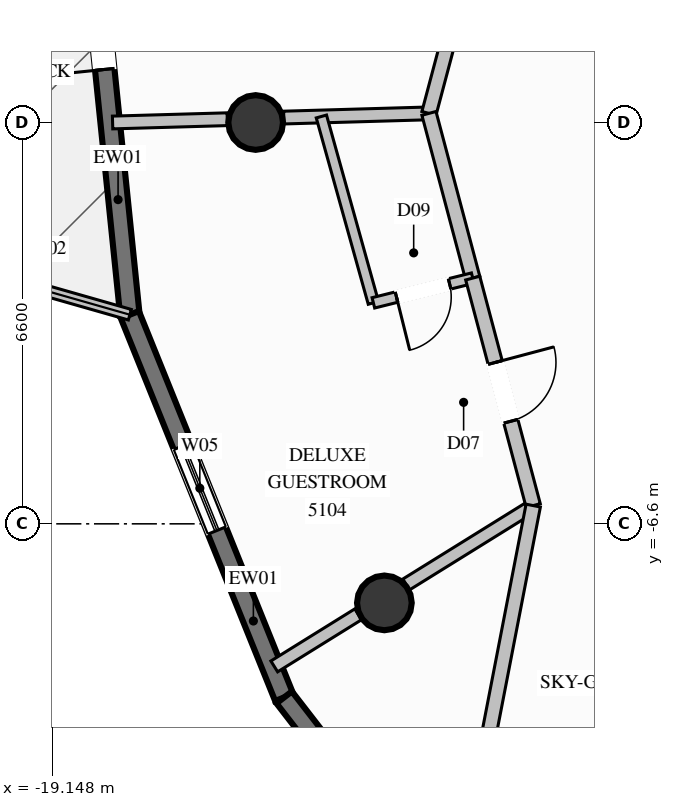
"""IFC4 building model, lengths in metres.
Left out: names, types, materials, properties, quantities, classifications, styles, units other than length and angle.
Written with IfcOpenShell. Run it as: python <this file> out.ifc"""

import sys

from ifc_helpers import new_model, si_unit, direction, frame, frame_2d, origin, origin_2d, place, context, subcontext, project, spatial, rectangle, circle, extrude, element, fill, save


model = new_model("IFC4")
c1 = context("Model", 3, precision=1e-05, world=origin(), true_north=direction((0.0, 1.0)))
c2 = subcontext(c1, "Body", "Model", "MODEL_VIEW")
j1 = project(units=[si_unit("LENGTHUNIT", "METRE"), si_unit("PLANEANGLEUNIT", "RADIAN")], contexts=[c1])
p1 = place(None, origin())
s1 = spatial("IfcSite", under=j1, at=p1, CompositionType="ELEMENT")
p2 = place(p1, origin())
s2 = spatial("IfcBuilding", under=s1, at=p2, CompositionType="ELEMENT")
p3 = place(p2, frame((0.0, 0.0, 191.2)))
s3 = spatial("IfcBuildingStorey", under=s2, at=p3, CompositionType="ELEMENT", Elevation=191.2)
for number, where, z_axis, x_axis in (
    (1, (-15.8, 0.0, 0.0), (0.0, 0.0, 1.0), (1.0, 0.0, 0.0)),
    (2, (-13.683, -7.9, 0.0), (0.0, 0.0, 1.0), (1.0, 0.0, 0.0)),
):
    element("IfcColumn", number, at=place(p3, frame(where, z_axis=z_axis, x_axis=x_axis)), inside=s3, PredefinedType="COLUMN", context=c2, shape_type="SweptSolid", body=[
        extrude(circle(Radius=0.45, at=origin_2d()), origin(), (0.0, 0.0, 1.0), 3.6),
    ])
p4 = place(p3, frame((-17.869, -3.161, 0.0), z_axis=(0.0, 0.0, 1.0), x_axis=(-0.101867372905, 0.994797988708, 0.0)))
e3 = element("IfcWall", 3, at=p4, inside=s3, PredefinedType="SOLIDWALL", context=c2, shape_type="SweptSolid", body=[
    extrude(rectangle(XDim=6.636, YDim=0.32, at=frame_2d((3.318, 0.0))), origin(), (0.0, 0.0, 1.0), 3.36),
])
p5 = place(p4, frame((4.055, 0.0, 0.0)))
e4 = element("IfcOpeningElement", 4, at=p5, cuts=e3, PredefinedType="OPENING", context=c2, shape_type="SweptSolid", body=[
    extrude(rectangle(XDim=1.6, YDim=2.3, at=frame_2d((0.8, 1.15))), frame((0.0, 0.17, 0.0), z_axis=(0.0, -1.0, 0.0), x_axis=(1.0, 0.0, 0.0)), (0.0, 0.0, 1.0), 0.34),
])
p6 = place(p3, frame((-15.331, -9.454, 0.0), z_axis=(0.0, 0.0, 1.0), x_axis=(-0.374000779889, 0.927428388956, 0.0)))
e5 = element("IfcWall", 5, at=p6, inside=s3, PredefinedType="SOLIDWALL", context=c2, shape_type="SweptSolid", body=[
    extrude(rectangle(XDim=6.786, YDim=0.32, at=frame_2d((3.393, 0.0))), origin(), (0.0, 0.0, 1.0), 3.36),
])
p7 = place(p6, frame((2.959, 0.0, 0.85)))
e6 = element("IfcOpeningElement", 6, at=p7, cuts=e5, PredefinedType="OPENING", context=c2, shape_type="SweptSolid", body=[
    extrude(rectangle(XDim=1.5, YDim=1.2, at=frame_2d((0.75, 0.6))), frame((0.0, 0.17, 0.0), z_axis=(0.0, -1.0, 0.0), x_axis=(1.0, 0.0, 0.0)), (0.0, 0.0, 1.0), 0.34),
])
p8 = place(p3, frame((-11.18, -14.821, 0.0), z_axis=(0.0, 0.0, 1.0), x_axis=(-0.611810985794, 0.791003993455, 0.0)))
e7 = element("IfcWall", 7, at=p8, inside=s3, PredefinedType="SOLIDWALL", context=c2, shape_type="SweptSolid", body=[
    extrude(rectangle(XDim=6.785, YDim=0.32, at=frame_2d((3.393, 0.0))), origin(), (0.0, 0.0, 1.0), 3.36),
])
p9 = place(p8, frame((2.642, 0.0, 0.85)))
e8 = element("IfcOpeningElement", 8, at=p9, cuts=e7, PredefinedType="OPENING", context=c2, shape_type="SweptSolid", body=[
    extrude(rectangle(XDim=1.5, YDim=1.2, at=frame_2d((0.75, 0.6))), frame((0.0, 0.17, 0.0), z_axis=(0.0, -1.0, 0.0), x_axis=(1.0, 0.0, 0.0)), (0.0, 0.0, 1.0), 0.34),
])
p10 = place(p3, frame((-20.645, -2.369, 0.0), z_axis=(0.0, 0.0, 1.0), x_axis=(0.961632376074, -0.274341344471, 0.0)))
e9 = element("IfcWall", 9, at=p10, inside=s3, PredefinedType="PARAPET", context=c2, shape_type="SweptSolid", body=[
    extrude(rectangle(XDim=2.887, YDim=0.18, at=frame_2d((1.443, 0.0))), origin(), (0.0, 0.0, 1.0), 1.12),
])
p11 = place(p3, frame((-12.95, 0.15, 0.0), z_axis=(0.0, 0.0, 1.0), x_axis=(-0.999584294169, -0.028831213149, 0.0)))
e10 = element("IfcWall", 10, at=p11, inside=s3, PredefinedType="PARTITIONING", context=c2, shape_type="SweptSolid", body=[
    extrude(rectangle(XDim=2.388, YDim=0.21, at=frame_2d((1.194, 0.0))), origin(), (0.0, 0.0, 1.0), 2.42),
])
p12 = place(p3, frame((-16.267, 0.054, 0.0), z_axis=(0.0, 0.0, 1.0), x_axis=(-0.999591030339, -0.028596714266, 0.0)))
e11 = element("IfcWall", 11, at=p12, inside=s3, PredefinedType="PARTITIONING", context=c2, shape_type="SweptSolid", body=[
    extrude(rectangle(XDim=1.887, YDim=0.21, at=frame_2d((0.943, 0.0))), origin(), (0.0, 0.0, 1.0), 2.42),
])
p13 = place(p3, frame((-11.235, -6.3, 0.0), z_axis=(0.0, 0.0, 1.0), x_axis=(-0.8495787928, -0.527461728302, 0.0)))
e12 = element("IfcWall", 12, at=p13, inside=s3, PredefinedType="PARTITIONING", context=c2, shape_type="SweptSolid", body=[
    extrude(rectangle(XDim=2.459, YDim=0.21, at=frame_2d((1.229, 0.0))), origin(), (0.0, 0.0, 1.0), 2.876),
])
p14 = place(p3, frame((-14.114, -8.088, 0.0), z_axis=(0.0, 0.0, 1.0), x_axis=(-0.849447375162, -0.527673342922, 0.0)))
e13 = element("IfcWall", 13, at=p14, inside=s3, PredefinedType="PARTITIONING", context=c2, shape_type="SweptSolid", body=[
    extrude(rectangle(XDim=1.625, YDim=0.21, at=frame_2d((0.812, 0.0))), origin(), (0.0, 0.0, 1.0), 3.36),
])
p15 = place(p3, frame((-11.955, 3.891, 0.0), z_axis=(0.0, 0.0, 1.0), x_axis=(-0.256991373998, -0.96641369697, 0.0)))
e14 = element("IfcWall", 14, at=p15, inside=s3, PredefinedType="PARTITIONING", context=c2, shape_type="SweptSolid", body=[
    extrude(rectangle(XDim=3.871, YDim=0.24, at=frame_2d((1.936, 0.0))), origin(), (0.0, 0.0, 1.0), 3.36),
])
p16 = place(p15, frame((1.436, 0.0, 0.0)))
e15 = element("IfcOpeningElement", 15, at=p16, cuts=e14, PredefinedType="OPENING", context=c2, shape_type="SweptSolid", body=[
    extrude(rectangle(XDim=1.0, YDim=2.2, at=frame_2d((0.5, 1.1))), frame((0.0, 0.13, 0.0), z_axis=(0.0, -1.0, 0.0), x_axis=(1.0, 0.0, 0.0)), (0.0, 0.0, 1.0), 0.26),
])
p17 = place(p3, frame((-12.95, 0.15, 0.0), z_axis=(0.0, 0.0, 1.0), x_axis=(0.25685481711, -0.966450000221, 0.0)))
e16 = element("IfcWall", 16, at=p17, inside=s3, PredefinedType="PARTITIONING", context=c2, shape_type="SweptSolid", body=[
    extrude(rectangle(XDim=2.803, YDim=0.24, at=frame_2d((1.401, 0.0))), origin(), (0.0, 0.0, 1.0), 3.36),
])
p18 = place(p3, frame((-14.719, 0.099, 0.0), z_axis=(0.0, 0.0, 1.0), x_axis=(0.268676474021, -0.963230477252, 0.0)))
e17 = element("IfcWall", 17, at=p18, inside=s3, PredefinedType="PLUMBINGWALL", context=c2, shape_type="SweptSolid", body=[
    extrude(rectangle(XDim=3.182, YDim=0.175, at=frame_2d((1.591, 0.0))), origin(), (0.0, 0.0, 1.0), 3.36),
])
p19 = place(p3, frame((-12.23, -2.559, 0.0), z_axis=(0.0, 0.0, 1.0), x_axis=(-0.9703553321, -0.24168270411, 0.0)))
e18 = element("IfcWall", 18, at=p19, inside=s3, PredefinedType="PLUMBINGWALL", context=c2, shape_type="SweptSolid", body=[
    extrude(rectangle(XDim=1.684, YDim=0.175, at=frame_2d((0.842, 0.0))), origin(), (0.0, 0.0, 1.0), 3.36),
])
p20 = place(p19, frame((0.392, 0.0, 0.0)))
e19 = element("IfcOpeningElement", 19, at=p20, cuts=e18, PredefinedType="OPENING", context=c2, shape_type="SweptSolid", body=[
    extrude(rectangle(XDim=0.9, YDim=2.1, at=frame_2d((0.45, 1.05))), frame((0.0, 0.098, 0.0), z_axis=(0.0, -1.0, 0.0), x_axis=(1.0, 0.0, 0.0)), (0.0, 0.0, 1.0), 0.195),
])
p21 = place(p3, frame((-12.23, -2.559, 0.0), z_axis=(0.0, 0.0, 1.0), x_axis=(0.257007037833, -0.966409531464, 0.0)))
e20 = element("IfcWall", 20, at=p21, inside=s3, PredefinedType="PARTITIONING", context=c2, shape_type="SweptSolid", body=[
    extrude(rectangle(XDim=3.871, YDim=0.24, at=frame_2d((1.936, 0.0))), origin(), (0.0, 0.0, 1.0), 3.36),
])
p22 = place(p21, frame((1.436, 0.0, 0.0)))
e21 = element("IfcOpeningElement", 21, at=p22, cuts=e20, PredefinedType="OPENING", context=c2, shape_type="SweptSolid", body=[
    extrude(rectangle(XDim=1.0, YDim=2.2, at=frame_2d((0.5, 1.1))), frame((0.0, 0.13, 0.0), z_axis=(0.0, -1.0, 0.0), x_axis=(1.0, 0.0, 0.0)), (0.0, 0.0, 1.0), 0.26),
])
p23 = place(p3, frame((-11.235, -6.3, 0.0), z_axis=(0.0, 0.0, 1.0), x_axis=(-0.190095078136, -0.981765685522, 0.0)))
e22 = element("IfcWall", 22, at=p23, inside=s3, PredefinedType="PARTITIONING", context=c2, shape_type="SweptSolid", body=[
    extrude(rectangle(XDim=5.602, YDim=0.24, at=frame_2d((2.801, 0.0))), origin(), (0.0, 0.0, 1.0), 3.36),
])
p24 = place(p5, origin())
e23 = element("IfcDoor", 23, at=p24, inside=s3, OperationType="SINGLE_SWING_LEFT", PredefinedType="DOOR", context=c2, shape_type="SweptSolid", body=[
    extrude(rectangle(XDim=1.6, YDim=2.3, at=frame_2d((0.8, 1.15))), frame((0.0, 0.025, 0.0), z_axis=(0.0, -1.0, 0.0), x_axis=(1.0, 0.0, 0.0)), (0.0, 0.0, 1.0), 0.05),
])
fill(e4, e23)
p25 = place(p7, origin())
e24 = element("IfcWindow", 24, at=p25, inside=s3, PartitioningType="SINGLE_PANEL", PredefinedType="WINDOW", context=c2, shape_type="SweptSolid", body=[
    extrude(rectangle(XDim=1.5, YDim=1.2, at=frame_2d((0.75, 0.6))), frame((0.0, 0.03, 0.0), z_axis=(0.0, -1.0, 0.0), x_axis=(1.0, 0.0, 0.0)), (0.0, 0.0, 1.0), 0.06),
])
fill(e6, e24)
p26 = place(p20, origin())
e25 = element("IfcDoor", 25, at=p26, inside=s3, OperationType="SINGLE_SWING_RIGHT", PredefinedType="DOOR", context=c2, shape_type="SweptSolid", body=[
    extrude(rectangle(XDim=0.9, YDim=2.1, at=frame_2d((0.45, 1.05))), frame((0.0, 0.025, 0.0), z_axis=(0.0, -1.0, 0.0), x_axis=(1.0, 0.0, 0.0)), (0.0, 0.0, 1.0), 0.05),
])
fill(e19, e25)
p27 = place(p22, origin())
e26 = element("IfcDoor", 26, at=p27, inside=s3, OperationType="SINGLE_SWING_LEFT", PredefinedType="DOOR", context=c2, shape_type="SweptSolid", body=[
    extrude(rectangle(XDim=1.0, YDim=2.2, at=frame_2d((0.5, 1.1))), frame((0.0, 0.025, 0.0), z_axis=(0.0, -1.0, 0.0), x_axis=(1.0, 0.0, 0.0)), (0.0, 0.0, 1.0), 0.05),
])
fill(e21, e26)
save(model, sys.argv[1])
